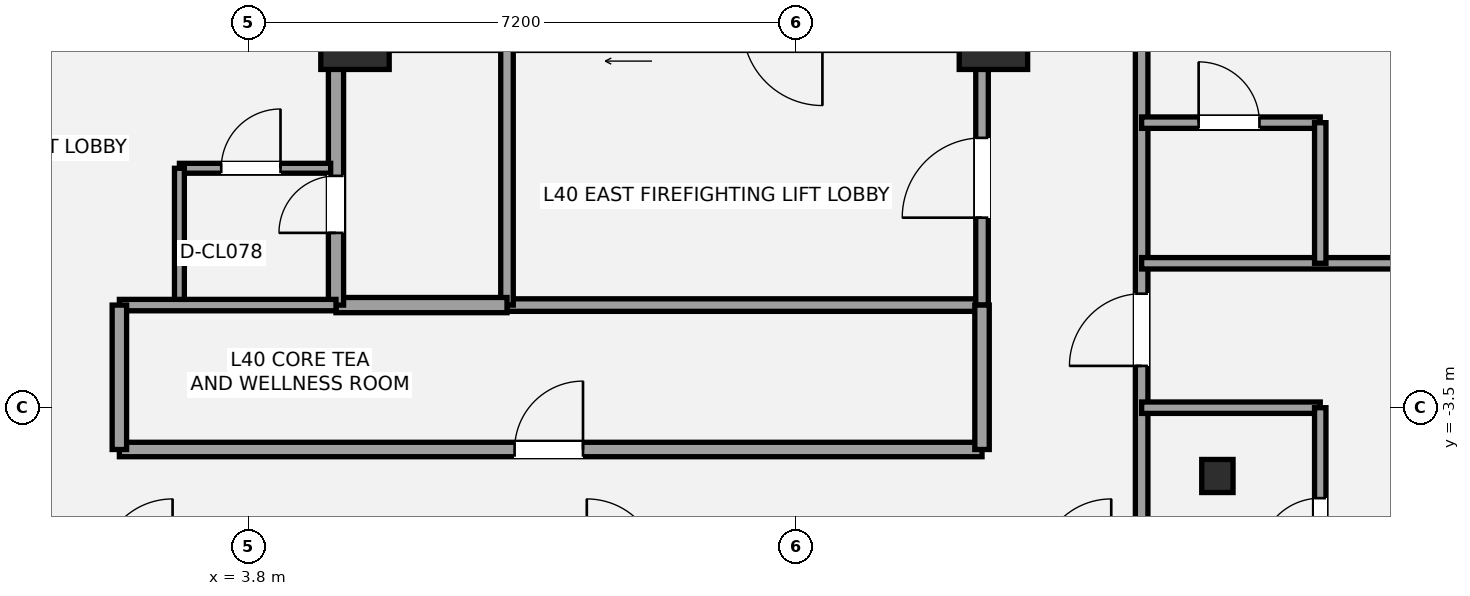
"""IFC4 building model, lengths in metres.
Left out: names, types, materials, properties, quantities, classifications, styles, units other than length and angle.
Written with IfcOpenShell. Run it as: python <this file> out.ifc"""

import sys

from ifc_helpers import new_model, si_unit, direction, frame, frame_2d, origin, origin_2d, place, context, subcontext, project, spatial, rectangle, i_section, extrude, element, fill, save


model = new_model("IFC4")
c1 = context("Model", 3, precision=1e-05, world=origin(), true_north=direction((0.0, 1.0)))
c2 = subcontext(c1, "Body", "Model", "MODEL_VIEW")
j1 = project(units=[si_unit("LENGTHUNIT", "METRE"), si_unit("PLANEANGLEUNIT", "RADIAN")], contexts=[c1])
p1 = place(None, origin())
s1 = spatial("IfcSite", under=j1, at=p1, CompositionType="ELEMENT")
p2 = place(p1, origin())
s2 = spatial("IfcBuilding", under=s1, at=p2, CompositionType="ELEMENT")
p3 = place(p2, frame((0.0, 0.0, 150.2)))
s3 = spatial("IfcBuildingStorey", under=s2, at=p3, CompositionType="ELEMENT", Elevation=150.2)
for number, where, z_axis, x_axis in (
    (1, (5.2, 1.4, 0.0), (0.0, 0.0, 1.0), (1.0, 0.0, 0.0)),
    (2, (13.6, 1.4, 0.0), (0.0, 0.0, 1.0), (1.0, 0.0, 0.0)),
):
    element("IfcColumn", number, at=place(p3, frame(where, z_axis=z_axis, x_axis=x_axis)), inside=s3, PredefinedType="COLUMN", context=c2, shape_type="SweptSolid", body=[
        extrude(rectangle(XDim=0.9, YDim=0.9, at=origin_2d()), origin(), (0.0, 0.0, 1.0), 3.2),
    ])
p4 = place(p3, frame((16.547, -4.398, 0.0), z_axis=(0.0, 0.0, 1.0), x_axis=(1.0, 0.0, 0.0)))
e3 = element("IfcColumn", 3, at=p4, inside=s3, PredefinedType="COLUMN", context=c2, shape_type="SweptSolid", body=[
    extrude(i_section(OverallWidth=0.412, OverallDepth=0.435, WebThickness=0.036, FlangeThickness=0.057, at=origin_2d()), origin(), (0.0, 0.0, 1.0), 3.2),
])
p5 = place(p3, frame((7.2, -2.15, 0.0), z_axis=(0.0, 0.0, 1.0), x_axis=(1.0, 0.0, 0.0)))
e4 = element("IfcWall", 4, at=p5, inside=s3, PredefinedType="PARTITIONING", context=c2, shape_type="SweptSolid", body=[
    extrude(rectangle(XDim=6.25, YDim=0.165, at=frame_2d((3.125, 0.0))), origin(), (0.0, 0.0, 1.0), 3.02),
])
p6 = place(p3, frame((7.2, -2.15, 0.0), z_axis=(0.0, 0.0, 1.0), x_axis=(0.0, 1.0, 0.0)))
e5 = element("IfcWall", 5, at=p6, inside=s3, PredefinedType="PARTITIONING", context=c2, shape_type="SweptSolid", body=[
    extrude(rectangle(XDim=3.4, YDim=0.165, at=frame_2d((1.7, 0.0))), origin(), (0.0, 0.0, 1.0), 3.02),
])
p7 = place(p3, frame((13.45, -2.15, 0.0), z_axis=(0.0, 0.0, 1.0), x_axis=(0.0, 1.0, 0.0)))
e6 = element("IfcWall", 6, at=p7, inside=s3, PredefinedType="PARTITIONING", context=c2, shape_type="SweptSolid", body=[
    extrude(rectangle(XDim=3.4, YDim=0.165, at=frame_2d((1.7, 0.0))), origin(), (0.0, 0.0, 1.0), 2.473),
])
p8 = place(p7, frame((1.15, 0.0, 0.0)))
e7 = element("IfcOpeningElement", 7, at=p8, cuts=e6, PredefinedType="OPENING", context=c2, shape_type="SweptSolid", body=[
    extrude(rectangle(XDim=1.05, YDim=2.15, at=frame_2d((0.525, 1.075))), frame((0.0, 0.093, 0.0), z_axis=(0.0, -1.0, 0.0), x_axis=(1.0, 0.0, 0.0)), (0.0, 0.0, 1.0), 0.185),
])
p9 = place(p3, frame((4.95, -2.15, 0.0), z_axis=(0.0, 0.0, 1.0), x_axis=(1.0, 0.0, 0.0)))
e8 = element("IfcWall", 8, at=p9, inside=s3, PredefinedType="SOLIDWALL", context=c2, shape_type="SweptSolid", body=[
    extrude(rectangle(XDim=2.25, YDim=0.2, at=frame_2d((1.125, 0.0))), origin(), (0.0, 0.0, 1.0), 3.02),
])
p10 = place(p3, frame((4.95, -2.15, 0.0), z_axis=(0.0, 0.0, 1.0), x_axis=(0.0, 1.0, 0.0)))
e9 = element("IfcWall", 9, at=p10, inside=s3, PredefinedType="SOLIDWALL", context=c2, shape_type="SweptSolid", body=[
    extrude(rectangle(XDim=3.4, YDim=0.2, at=frame_2d((1.7, 0.0))), origin(), (0.0, 0.0, 1.0), 2.473),
])
p11 = place(p10, frame((0.95, 0.0, 0.0)))
e10 = element("IfcOpeningElement", 10, at=p11, cuts=e9, PredefinedType="OPENING", context=c2, shape_type="SweptSolid", body=[
    extrude(rectangle(XDim=0.75, YDim=2.1, at=frame_2d((0.375, 1.05))), frame((0.0, 0.11, 0.0), z_axis=(0.0, -1.0, 0.0), x_axis=(1.0, 0.0, 0.0)), (0.0, 0.0, 1.0), 0.22),
])
p12 = place(p3, frame((2.89, -0.35, 0.0), z_axis=(0.0, 0.0, 1.0), x_axis=(1.0, 0.0, 0.0)))
e11 = element("IfcWall", 11, at=p12, inside=s3, PredefinedType="PARTITIONING", context=c2, shape_type="SweptSolid", body=[
    extrude(rectangle(XDim=1.99, YDim=0.13, at=frame_2d((0.995, 0.0))), origin(), (0.0, 0.0, 1.0), 3.02),
])
p13 = place(p12, frame((0.55, 0.0, 0.0)))
e12 = element("IfcOpeningElement", 12, at=p13, cuts=e11, PredefinedType="OPENING", context=c2, shape_type="SweptSolid", body=[
    extrude(rectangle(XDim=0.78, YDim=2.1, at=frame_2d((0.39, 1.05))), frame((0.0, 0.075, 0.0), z_axis=(0.0, -1.0, 0.0), x_axis=(1.0, 0.0, 0.0)), (0.0, 0.0, 1.0), 0.15),
])
p14 = place(p3, frame((2.89, -2.15, 0.0), z_axis=(0.0, 0.0, 1.0), x_axis=(0.0, 1.0, 0.0)))
e13 = element("IfcWall", 13, at=p14, inside=s3, PredefinedType="PARTITIONING", context=c2, shape_type="SweptSolid", body=[
    extrude(rectangle(XDim=1.8, YDim=0.13, at=frame_2d((0.9, 0.0))), origin(), (0.0, 0.0, 1.0), 3.02),
])
p15 = place(p3, frame((2.1, -4.05, 0.0), z_axis=(0.0, 0.0, 1.0), x_axis=(1.0, 0.0, 0.0)))
e14 = element("IfcWall", 14, at=p15, inside=s3, PredefinedType="PLUMBINGWALL", context=c2, shape_type="SweptSolid", body=[
    extrude(rectangle(XDim=11.35, YDim=0.19, at=frame_2d((5.675, 0.0))), origin(), (0.0, 0.0, 1.0), 2.473),
])
p16 = place(p15, frame((5.2, 0.0, 0.0)))
e15 = element("IfcOpeningElement", 15, at=p16, cuts=e14, PredefinedType="OPENING", context=c2, shape_type="SweptSolid", body=[
    extrude(rectangle(XDim=0.9, YDim=2.1, at=frame_2d((0.45, 1.05))), frame((0.0, 0.105, 0.0), z_axis=(0.0, -1.0, 0.0), x_axis=(1.0, 0.0, 0.0)), (0.0, 0.0, 1.0), 0.21),
])
p17 = place(p3, frame((2.1, -2.15, 0.0), z_axis=(0.0, 0.0, 1.0), x_axis=(1.0, 0.0, 0.0)))
e16 = element("IfcWall", 16, at=p17, inside=s3, PredefinedType="PLUMBINGWALL", context=c2, shape_type="SweptSolid", body=[
    extrude(rectangle(XDim=2.85, YDim=0.15, at=frame_2d((1.425, 0.0))), origin(), (0.0, 0.0, 1.0), 3.02),
])
p18 = place(p3, frame((2.1, -4.05, 0.0), z_axis=(0.0, 0.0, 1.0), x_axis=(0.0, 1.0, 0.0)))
e17 = element("IfcWall", 17, at=p18, inside=s3, PredefinedType="PLUMBINGWALL", context=c2, shape_type="SweptSolid", body=[
    extrude(rectangle(XDim=1.9, YDim=0.19, at=frame_2d((0.95, 0.0))), origin(), (0.0, 0.0, 1.0), 3.02),
])
p19 = place(p3, frame((13.45, -4.05, 0.0), z_axis=(0.0, 0.0, 1.0), x_axis=(0.0, 1.0, 0.0)))
e18 = element("IfcWall", 18, at=p19, inside=s3, PredefinedType="PLUMBINGWALL", context=c2, shape_type="SweptSolid", body=[
    extrude(rectangle(XDim=1.9, YDim=0.19, at=frame_2d((0.95, 0.0))), origin(), (0.0, 0.0, 1.0), 2.473),
])
p20 = place(p3, frame((15.55, -13.587, 0.0), z_axis=(0.0, 0.0, 1.0), x_axis=(0.0, 1.0, 0.0)))
e19 = element("IfcWall", 19, at=p20, inside=s3, PredefinedType="PARTITIONING", context=c2, shape_type="SweptSolid", body=[
    extrude(rectangle(XDim=21.137, YDim=0.165, at=frame_2d((10.568, 0.0))), origin(), (0.0, 0.0, 1.0), 2.473),
])
p21 = place(p20, frame((6.587, 0.0, 0.0)))
e20 = element("IfcOpeningElement", 20, at=p21, cuts=e19, PredefinedType="OPENING", context=c2, shape_type="SweptSolid", body=[
    extrude(rectangle(XDim=0.85, YDim=2.1, at=frame_2d((0.425, 1.05))), frame((0.0, 0.093, 0.0), z_axis=(0.0, -1.0, 0.0), x_axis=(1.0, 0.0, 0.0)), (0.0, 0.0, 1.0), 0.185),
])
p22 = place(p20, frame((10.637, 0.0, 0.0)))
e21 = element("IfcOpeningElement", 21, at=p22, cuts=e19, PredefinedType="OPENING", context=c2, shape_type="SweptSolid", body=[
    extrude(rectangle(XDim=0.95, YDim=2.15, at=frame_2d((0.475, 1.075))), frame((0.0, 0.093, 0.0), z_axis=(0.0, -1.0, 0.0), x_axis=(1.0, 0.0, 0.0)), (0.0, 0.0, 1.0), 0.185),
])
p23 = place(p20, frame((15.037, 0.0, 0.0)))
e22 = element("IfcOpeningElement", 22, at=p23, cuts=e19, PredefinedType="OPENING", context=c2, shape_type="SweptSolid", body=[
    extrude(rectangle(XDim=0.95, YDim=2.15, at=frame_2d((0.475, 1.075))), frame((0.0, 0.093, 0.0), z_axis=(0.0, -1.0, 0.0), x_axis=(1.0, 0.0, 0.0)), (0.0, 0.0, 1.0), 0.185),
])
p24 = place(p20, frame((19.787, 0.0, 0.0)))
e23 = element("IfcOpeningElement", 23, at=p24, cuts=e19, PredefinedType="OPENING", context=c2, shape_type="SweptSolid", body=[
    extrude(rectangle(XDim=0.95, YDim=2.15, at=frame_2d((0.475, 1.075))), frame((0.0, 0.093, 0.0), z_axis=(0.0, -1.0, 0.0), x_axis=(1.0, 0.0, 0.0)), (0.0, 0.0, 1.0), 0.185),
])
p25 = place(p3, frame((15.55, -1.6, 0.0), z_axis=(0.0, 0.0, 1.0), x_axis=(1.0, 0.0, 0.0)))
e24 = element("IfcWall", 24, at=p25, inside=s3, PredefinedType="PLUMBINGWALL", context=c2, shape_type="SweptSolid", body=[
    extrude(rectangle(XDim=8.678, YDim=0.15, at=frame_2d((4.339, 0.0))), origin(), (0.0, 0.0, 1.0), 2.398),
])
p26 = place(p3, frame((15.55, -3.5, 0.0), z_axis=(0.0, 0.0, 1.0), x_axis=(1.0, 0.0, 0.0)))
e25 = element("IfcWall", 25, at=p26, inside=s3, PredefinedType="PLUMBINGWALL", context=c2, shape_type="SweptSolid", body=[
    extrude(rectangle(XDim=2.35, YDim=0.15, at=frame_2d((1.175, 0.0))), origin(), (0.0, 0.0, 1.0), 2.398),
])
p27 = place(p3, frame((17.9, -5.65, 0.0), z_axis=(0.0, 0.0, 1.0), x_axis=(0.0, 1.0, 0.0)))
e26 = element("IfcWall", 26, at=p27, inside=s3, PredefinedType="PLUMBINGWALL", context=c2, shape_type="SweptSolid", body=[
    extrude(rectangle(XDim=2.15, YDim=0.15, at=frame_2d((1.075, 0.0))), origin(), (0.0, 0.0, 1.0), 2.473),
])
p28 = place(p27, frame((0.16, 0.0, 0.0)))
e27 = element("IfcOpeningElement", 27, at=p28, cuts=e26, PredefinedType="OPENING", context=c2, shape_type="SweptSolid", body=[
    extrude(rectangle(XDim=0.8, YDim=2.1, at=frame_2d((0.4, 1.05))), frame((0.0, 0.085, 0.0), z_axis=(0.0, -1.0, 0.0), x_axis=(1.0, 0.0, 0.0)), (0.0, 0.0, 1.0), 0.17),
])
p29 = place(p3, frame((15.55, 0.25, 0.0), z_axis=(0.0, 0.0, 1.0), x_axis=(1.0, 0.0, 0.0)))
e28 = element("IfcWall", 28, at=p29, inside=s3, PredefinedType="PLUMBINGWALL", context=c2, shape_type="SweptSolid", body=[
    extrude(rectangle(XDim=2.35, YDim=0.15, at=frame_2d((1.175, 0.0))), origin(), (0.0, 0.0, 1.0), 2.473),
])
p30 = place(p29, frame((0.75, 0.0, 0.0)))
e29 = element("IfcOpeningElement", 29, at=p30, cuts=e28, PredefinedType="OPENING", context=c2, shape_type="SweptSolid", body=[
    extrude(rectangle(XDim=0.8, YDim=2.1, at=frame_2d((0.4, 1.05))), frame((0.0, 0.085, 0.0), z_axis=(0.0, -1.0, 0.0), x_axis=(1.0, 0.0, 0.0)), (0.0, 0.0, 1.0), 0.17),
])
p31 = place(p3, frame((17.9, -1.6, 0.0), z_axis=(0.0, 0.0, 1.0), x_axis=(0.0, 1.0, 0.0)))
e30 = element("IfcWall", 30, at=p31, inside=s3, PredefinedType="PLUMBINGWALL", context=c2, shape_type="SweptSolid", body=[
    extrude(rectangle(XDim=1.85, YDim=0.15, at=frame_2d((0.925, 0.0))), origin(), (0.0, 0.0, 1.0), 3.02),
])
p32 = place(p8, origin())
e31 = element("IfcDoor", 31, at=p32, inside=s3, OperationType="SINGLE_SWING_LEFT", PredefinedType="DOOR", context=c2, shape_type="SweptSolid", body=[
    extrude(rectangle(XDim=1.05, YDim=2.15, at=frame_2d((0.525, 1.075))), frame((0.0, 0.025, 0.0), z_axis=(0.0, -1.0, 0.0), x_axis=(1.0, 0.0, 0.0)), (0.0, 0.0, 1.0), 0.05),
])
fill(e7, e31)
p33 = place(p11, origin())
e32 = element("IfcDoor", 32, at=p33, inside=s3, OperationType="SINGLE_SWING_LEFT", PredefinedType="DOOR", context=c2, shape_type="SweptSolid", body=[
    extrude(rectangle(XDim=0.75, YDim=2.1, at=frame_2d((0.375, 1.05))), frame((0.0, 0.025, 0.0), z_axis=(0.0, -1.0, 0.0), x_axis=(1.0, 0.0, 0.0)), (0.0, 0.0, 1.0), 0.05),
])
fill(e10, e32)
p34 = place(p13, origin())
e33 = element("IfcDoor", 33, at=p34, inside=s3, OperationType="SINGLE_SWING_RIGHT", PredefinedType="DOOR", context=c2, shape_type="SweptSolid", body=[
    extrude(rectangle(XDim=0.78, YDim=2.1, at=frame_2d((0.39, 1.05))), frame((0.0, 0.025, 0.0), z_axis=(0.0, -1.0, 0.0), x_axis=(1.0, 0.0, 0.0)), (0.0, 0.0, 1.0), 0.05),
])
fill(e12, e33)
p35 = place(p16, origin())
e34 = element("IfcDoor", 34, at=p35, inside=s3, OperationType="SINGLE_SWING_RIGHT", PredefinedType="DOOR", context=c2, shape_type="SweptSolid", body=[
    extrude(rectangle(XDim=0.9, YDim=2.1, at=frame_2d((0.45, 1.05))), frame((0.0, 0.025, 0.0), z_axis=(0.0, -1.0, 0.0), x_axis=(1.0, 0.0, 0.0)), (0.0, 0.0, 1.0), 0.05),
])
fill(e15, e34)
p36 = place(p22, origin())
e35 = element("IfcDoor", 35, at=p36, inside=s3, OperationType="SINGLE_SWING_LEFT", PredefinedType="DOOR", context=c2, shape_type="SweptSolid", body=[
    extrude(rectangle(XDim=0.95, YDim=2.15, at=frame_2d((0.475, 1.075))), frame((0.0, 0.025, 0.0), z_axis=(0.0, -1.0, 0.0), x_axis=(1.0, 0.0, 0.0)), (0.0, 0.0, 1.0), 0.05),
])
fill(e21, e35)
p37 = place(p28, origin())
e36 = element("IfcDoor", 36, at=p37, inside=s3, OperationType="SINGLE_SWING_LEFT", PredefinedType="DOOR", context=c2, shape_type="SweptSolid", body=[
    extrude(rectangle(XDim=0.8, YDim=2.1, at=frame_2d((0.4, 1.05))), frame((0.0, 0.025, 0.0), z_axis=(0.0, -1.0, 0.0), x_axis=(1.0, 0.0, 0.0)), (0.0, 0.0, 1.0), 0.05),
])
fill(e27, e36)
p38 = place(p30, origin())
e37 = element("IfcDoor", 37, at=p38, inside=s3, OperationType="SINGLE_SWING_LEFT", PredefinedType="DOOR", context=c2, shape_type="SweptSolid", body=[
    extrude(rectangle(XDim=0.8, YDim=2.1, at=frame_2d((0.4, 1.05))), frame((0.0, 0.025, 0.0), z_axis=(0.0, -1.0, 0.0), x_axis=(1.0, 0.0, 0.0)), (0.0, 0.0, 1.0), 0.05),
])
fill(e29, e37)
save(model, sys.argv[1])
